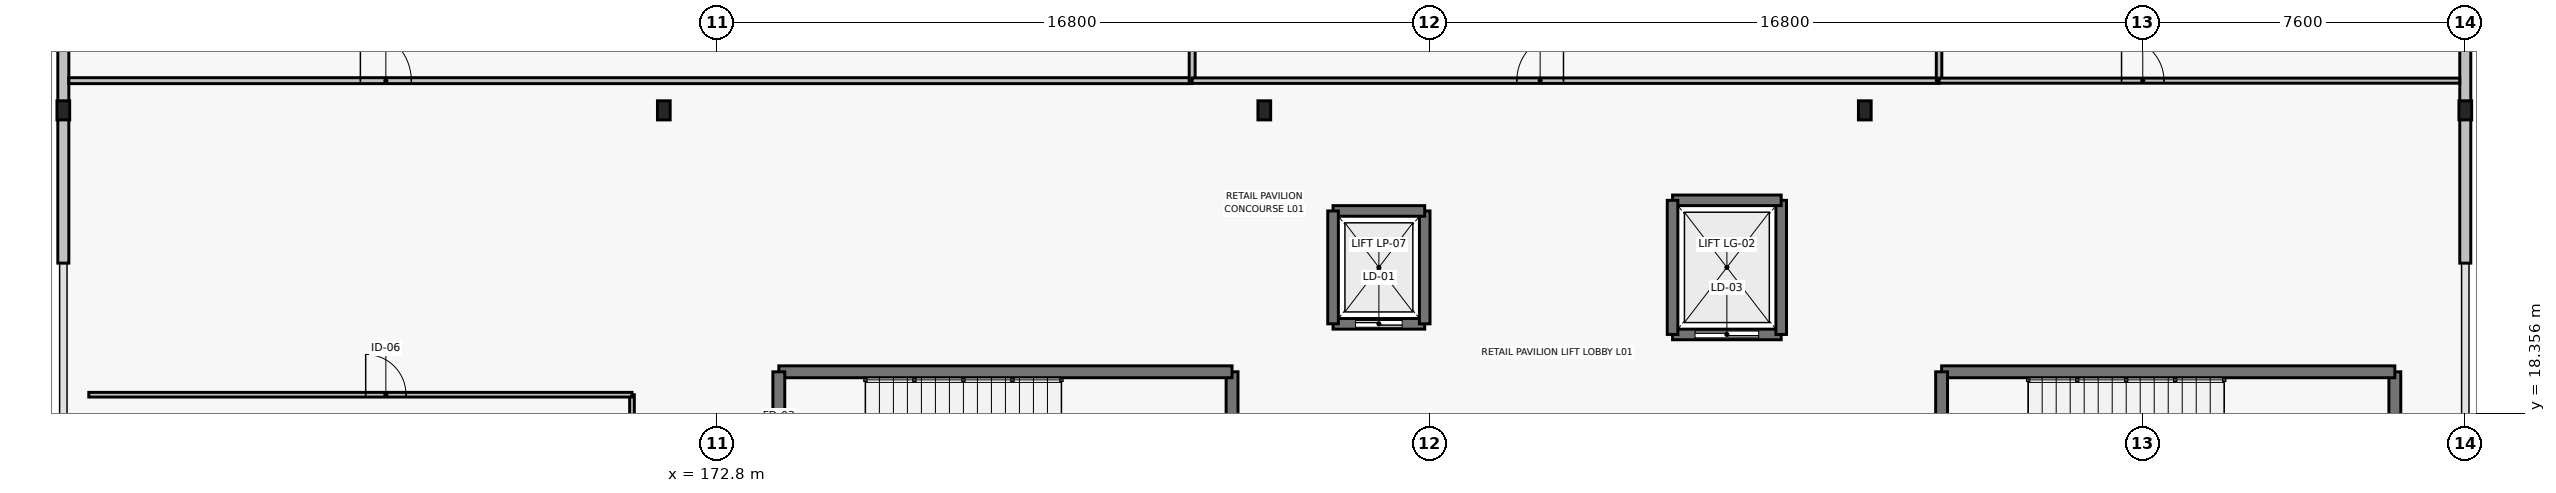
"""IFC4 building model, lengths in metres.
Left out: names, types, materials, properties, quantities, classifications, styles, units other than length and angle.
Written with IfcOpenShell. Run it as: python <this file> out.ifc"""

import sys

from ifc_helpers import new_model, si_unit, direction, frame, frame_2d, origin, origin_2d, place, context, subcontext, project, spatial, rectangle, i_section, extrude, element, fill, save


model = new_model("IFC4")
c1 = context("Model", 3, precision=1e-05, world=origin(), true_north=direction((0.0, 1.0)))
c2 = subcontext(c1, "Body", "Model", "MODEL_VIEW")
j1 = project(units=[si_unit("LENGTHUNIT", "METRE"), si_unit("PLANEANGLEUNIT", "RADIAN")], contexts=[c1])
p1 = place(None, origin())
s1 = spatial("IfcSite", under=j1, at=p1, CompositionType="ELEMENT")
p2 = place(p1, origin())
s2 = spatial("IfcBuilding", under=s1, at=p2, CompositionType="ELEMENT")
p3 = place(p2, frame((0.0, 0.0, 5.4)))
s3 = spatial("IfcBuildingStorey", under=s2, at=p3, CompositionType="ELEMENT", Elevation=5.4)
for number, where, z_axis, x_axis in (
    (1, (157.4, 25.5, 0.0), (0.0, 0.0, 1.0), (1.0, 0.0, 0.0)),
    (2, (171.55, 25.5, 0.0), (0.0, 0.0, 1.0), (1.0, 0.0, 0.0)),
    (3, (185.7, 25.5, 0.0), (0.0, 0.0, 1.0), (1.0, 0.0, 0.0)),
    (4, (199.85, 25.5, 0.0), (0.0, 0.0, 1.0), (1.0, 0.0, 0.0)),
    (5, (214.0, 25.5, 0.0), (0.0, 0.0, 1.0), (1.0, 0.0, 0.0)),
):
    element("IfcColumn", number, at=place(p3, frame(where, z_axis=z_axis, x_axis=x_axis)), inside=s3, PredefinedType="COLUMN", context=c2, shape_type="SweptSolid", body=[
        extrude(i_section(OverallWidth=0.3, OverallDepth=0.45, WebThickness=0.014, FlangeThickness=0.026, FilletRadius=0.027, at=origin_2d()), origin(), (0.0, 0.0, 1.0), 5.4),
    ])
for number, where, z_axis, x_axis in (
    (6, (157.4, 21.9, 0.0), (0.0, 0.0, 1.0), (0.0, 1.0, 0.0)),
    (7, (157.4, 25.5, 0.0), (0.0, 0.0, 1.0), (0.0, 1.0, 0.0)),
    (8, (214.0, 21.9, 0.0), (0.0, 0.0, 1.0), (0.0, 1.0, 0.0)),
    (9, (214.0, 25.5, 0.0), (0.0, 0.0, 1.0), (0.0, 1.0, 0.0)),
):
    element("IfcWall", number, at=place(p3, frame(where, z_axis=z_axis, x_axis=x_axis)), inside=s3, PredefinedType="STANDARD", context=c2, shape_type="SweptSolid", body=[
        extrude(rectangle(XDim=3.6, YDim=0.26, at=frame_2d((1.8, 0.0))), origin(), (0.0, 0.0, 1.0), 4.675),
    ])
p4 = place(p3, frame((184.94, 15.06, 0.0), z_axis=(0.0, 0.0, 1.0), x_axis=(0.0, 1.0, 0.0)))
e10 = element("IfcWall", 10, at=p4, inside=s3, PredefinedType="SHEAR", context=c2, shape_type="SweptSolid", body=[
    extrude(rectangle(XDim=4.28, YDim=0.28, at=frame_2d((2.14, 0.0))), origin(), (0.0, 0.0, 1.0), 5.18),
])
p5 = place(p3, frame((184.94, 19.34, 0.0), z_axis=(0.0, 0.0, 1.0), x_axis=(-1.0, 0.0, 0.0)))
e11 = element("IfcWall", 11, at=p5, inside=s3, PredefinedType="SHEAR", context=c2, shape_type="SweptSolid", body=[
    extrude(rectangle(XDim=10.68, YDim=0.28, at=frame_2d((5.34, 0.0))), origin(), (0.0, 0.0, 1.0), 5.18),
])
p6 = place(p3, frame((174.26, 19.34, 0.0), z_axis=(0.0, 0.0, 1.0), x_axis=(0.0, -1.0, 0.0)))
e12 = element("IfcWall", 12, at=p6, inside=s3, PredefinedType="SHEAR", context=c2, shape_type="SweptSolid", body=[
    extrude(rectangle(XDim=4.28, YDim=0.28, at=frame_2d((2.14, 0.0))), origin(), (0.0, 0.0, 1.0), 5.18),
])
p7 = place(p6, frame((1.565, 0.0, 0.0)))
e13 = element("IfcOpeningElement", 13, at=p7, cuts=e12, PredefinedType="OPENING", context=c2, shape_type="SweptSolid", body=[
    extrude(rectangle(XDim=1.15, YDim=2.2, at=frame_2d((0.575, 1.1))), frame((0.0, 0.15, 0.0), z_axis=(0.0, -1.0, 0.0), x_axis=(1.0, 0.0, 0.0)), (0.0, 0.0, 1.0), 0.3),
])
p8 = place(p3, frame((212.34, 15.06, 0.0), z_axis=(0.0, 0.0, 1.0), x_axis=(0.0, 1.0, 0.0)))
e14 = element("IfcWall", 14, at=p8, inside=s3, PredefinedType="SHEAR", context=c2, shape_type="SweptSolid", body=[
    extrude(rectangle(XDim=4.28, YDim=0.28, at=frame_2d((2.14, 0.0))), origin(), (0.0, 0.0, 1.0), 5.18),
])
p9 = place(p3, frame((212.34, 19.34, 0.0), z_axis=(0.0, 0.0, 1.0), x_axis=(-1.0, 0.0, 0.0)))
e15 = element("IfcWall", 15, at=p9, inside=s3, PredefinedType="SHEAR", context=c2, shape_type="SweptSolid", body=[
    extrude(rectangle(XDim=10.68, YDim=0.28, at=frame_2d((5.34, 0.0))), origin(), (0.0, 0.0, 1.0), 5.18),
])
p10 = place(p3, frame((201.66, 19.34, 0.0), z_axis=(0.0, 0.0, 1.0), x_axis=(0.0, -1.0, 0.0)))
e16 = element("IfcWall", 16, at=p10, inside=s3, PredefinedType="SHEAR", context=c2, shape_type="SweptSolid", body=[
    extrude(rectangle(XDim=4.28, YDim=0.28, at=frame_2d((2.14, 0.0))), origin(), (0.0, 0.0, 1.0), 5.18),
])
p11 = place(p10, frame((1.565, 0.0, 0.0)))
e17 = element("IfcOpeningElement", 17, at=p11, cuts=e16, PredefinedType="OPENING", context=c2, shape_type="SweptSolid", body=[
    extrude(rectangle(XDim=1.15, YDim=2.2, at=frame_2d((0.575, 1.1))), frame((0.0, 0.15, 0.0), z_axis=(0.0, -1.0, 0.0), x_axis=(1.0, 0.0, 0.0)), (0.0, 0.0, 1.0), 0.3),
])
p12 = place(p3, frame((187.32, 20.47, 0.0), z_axis=(0.0, 0.0, 1.0), x_axis=(1.0, 0.0, 0.0)))
e18 = element("IfcWall", 18, at=p12, inside=s3, PredefinedType="SHEAR", context=c2, shape_type="SweptSolid", body=[
    extrude(rectangle(XDim=2.16, YDim=0.25, at=frame_2d((1.08, 0.0))), origin(), (0.0, 0.0, 1.0), 5.18),
])
p13 = place(p12, frame((0.53, 0.0, 0.0)))
e19 = element("IfcOpeningElement", 19, at=p13, cuts=e18, PredefinedType="OPENING", context=c2, shape_type="SweptSolid", body=[
    extrude(rectangle(XDim=1.1, YDim=2.2, at=frame_2d((0.55, 1.1))), frame((0.0, 0.135, 0.0), z_axis=(0.0, -1.0, 0.0), x_axis=(1.0, 0.0, 0.0)), (0.0, 0.0, 1.0), 0.27),
])
p14 = place(p3, frame((189.48, 20.47, 0.0), z_axis=(0.0, 0.0, 1.0), x_axis=(0.0, 1.0, 0.0)))
e20 = element("IfcWall", 20, at=p14, inside=s3, PredefinedType="SHEAR", context=c2, shape_type="SweptSolid", body=[
    extrude(rectangle(XDim=2.66, YDim=0.25, at=frame_2d((1.33, 0.0))), origin(), (0.0, 0.0, 1.0), 5.18),
])
p15 = place(p3, frame((189.48, 23.13, 0.0), z_axis=(0.0, 0.0, 1.0), x_axis=(-1.0, 0.0, 0.0)))
e21 = element("IfcWall", 21, at=p15, inside=s3, PredefinedType="SHEAR", context=c2, shape_type="SweptSolid", body=[
    extrude(rectangle(XDim=2.16, YDim=0.25, at=frame_2d((1.08, 0.0))), origin(), (0.0, 0.0, 1.0), 5.18),
])
p16 = place(p3, frame((187.32, 23.13, 0.0), z_axis=(0.0, 0.0, 1.0), x_axis=(0.0, -1.0, 0.0)))
e22 = element("IfcWall", 22, at=p16, inside=s3, PredefinedType="SHEAR", context=c2, shape_type="SweptSolid", body=[
    extrude(rectangle(XDim=2.66, YDim=0.25, at=frame_2d((1.33, 0.0))), origin(), (0.0, 0.0, 1.0), 5.18),
])
p17 = place(p3, frame((195.32, 20.22, 0.0), z_axis=(0.0, 0.0, 1.0), x_axis=(1.0, 0.0, 0.0)))
e23 = element("IfcWall", 23, at=p17, inside=s3, PredefinedType="SHEAR", context=c2, shape_type="SweptSolid", body=[
    extrude(rectangle(XDim=2.56, YDim=0.25, at=frame_2d((1.28, 0.0))), origin(), (0.0, 0.0, 1.0), 5.18),
])
p18 = place(p17, frame((0.53, 0.0, 0.0)))
e24 = element("IfcOpeningElement", 24, at=p18, cuts=e23, PredefinedType="OPENING", context=c2, shape_type="SweptSolid", body=[
    extrude(rectangle(XDim=1.5, YDim=2.3, at=frame_2d((0.75, 1.15))), frame((0.0, 0.135, 0.0), z_axis=(0.0, -1.0, 0.0), x_axis=(1.0, 0.0, 0.0)), (0.0, 0.0, 1.0), 0.27),
])
p19 = place(p3, frame((197.88, 20.22, 0.0), z_axis=(0.0, 0.0, 1.0), x_axis=(0.0, 1.0, 0.0)))
e25 = element("IfcWall", 25, at=p19, inside=s3, PredefinedType="SHEAR", context=c2, shape_type="SweptSolid", body=[
    extrude(rectangle(XDim=3.16, YDim=0.25, at=frame_2d((1.58, 0.0))), origin(), (0.0, 0.0, 1.0), 5.18),
])
p20 = place(p3, frame((197.88, 23.38, 0.0), z_axis=(0.0, 0.0, 1.0), x_axis=(-1.0, 0.0, 0.0)))
e26 = element("IfcWall", 26, at=p20, inside=s3, PredefinedType="SHEAR", context=c2, shape_type="SweptSolid", body=[
    extrude(rectangle(XDim=2.56, YDim=0.25, at=frame_2d((1.28, 0.0))), origin(), (0.0, 0.0, 1.0), 5.18),
])
p21 = place(p3, frame((195.32, 23.38, 0.0), z_axis=(0.0, 0.0, 1.0), x_axis=(0.0, -1.0, 0.0)))
e27 = element("IfcWall", 27, at=p21, inside=s3, PredefinedType="SHEAR", context=c2, shape_type="SweptSolid", body=[
    extrude(rectangle(XDim=3.16, YDim=0.25, at=frame_2d((1.58, 0.0))), origin(), (0.0, 0.0, 1.0), 5.18),
])
p22 = place(p3, frame((157.53, 26.2, 0.0), z_axis=(0.0, 0.0, 1.0), x_axis=(1.0, 0.0, 0.0)))
e28 = element("IfcWall", 28, at=p22, inside=s3, PredefinedType="PARTITIONING", context=c2, shape_type="SweptSolid", body=[
    extrude(rectangle(XDim=26.47, YDim=0.14, at=frame_2d((13.235, 0.0))), origin(), (0.0, 0.0, 1.0), 4.625),
])
p23 = place(p22, frame((6.87, 0.0, 0.0)))
e29 = element("IfcOpeningElement", 29, at=p23, cuts=e28, PredefinedType="OPENING", context=c2, shape_type="SweptSolid", body=[
    extrude(rectangle(XDim=1.2, YDim=2.2, at=frame_2d((0.6, 1.1))), frame((0.0, 0.08, 0.0), z_axis=(0.0, -1.0, 0.0), x_axis=(1.0, 0.0, 0.0)), (0.0, 0.0, 1.0), 0.16),
])
p24 = place(p3, frame((184.0, 26.2, 0.0), z_axis=(0.0, 0.0, 1.0), x_axis=(0.0, 1.0, 0.0)))
e30 = element("IfcWall", 30, at=p24, inside=s3, PredefinedType="PARTITIONING", context=c2, shape_type="SweptSolid", body=[
    extrude(rectangle(XDim=11.67, YDim=0.14, at=frame_2d((5.835, 0.0))), origin(), (0.0, 0.0, 1.0), 5.16),
])
p25 = place(p3, frame((184.0, 26.2, 0.0), z_axis=(0.0, 0.0, 1.0), x_axis=(1.0, 0.0, 0.0)))
e31 = element("IfcWall", 31, at=p25, inside=s3, PredefinedType="PARTITIONING", context=c2, shape_type="SweptSolid", body=[
    extrude(rectangle(XDim=17.6, YDim=0.13, at=frame_2d((8.8, 0.0))), origin(), (0.0, 0.0, 1.0), 4.625),
])
p26 = place(p25, frame((8.75, 0.0, 0.0), z_axis=(0.0, 0.0, 1.0), x_axis=(-1.0, 0.0, 0.0)))
e32 = element("IfcOpeningElement", 32, at=p26, cuts=e31, PredefinedType="OPENING", context=c2, shape_type="SweptSolid", body=[
    extrude(rectangle(XDim=1.1, YDim=2.15, at=frame_2d((0.55, 1.075))), frame((0.0, 0.075, 0.0), z_axis=(0.0, -1.0, 0.0), x_axis=(1.0, 0.0, 0.0)), (0.0, 0.0, 1.0), 0.15),
])
p27 = place(p3, frame((201.6, 26.2, 0.0), z_axis=(0.0, 0.0, 1.0), x_axis=(0.0, 1.0, 0.0)))
e33 = element("IfcWall", 33, at=p27, inside=s3, PredefinedType="PARTITIONING", context=c2, shape_type="SweptSolid", body=[
    extrude(rectangle(XDim=11.67, YDim=0.13, at=frame_2d((5.835, 0.0))), origin(), (0.0, 0.0, 1.0), 5.16),
])
p28 = place(p3, frame((201.6, 26.2, 0.0), z_axis=(0.0, 0.0, 1.0), x_axis=(1.0, 0.0, 0.0)))
e34 = element("IfcWall", 34, at=p28, inside=s3, PredefinedType="PARTITIONING", context=c2, shape_type="SweptSolid", body=[
    extrude(rectangle(XDim=12.27, YDim=0.12, at=frame_2d((6.135, 0.0))), origin(), (0.0, 0.0, 1.0), 4.625),
])
p29 = place(p28, frame((4.3, 0.0, 0.0)))
e35 = element("IfcOpeningElement", 35, at=p29, cuts=e34, PredefinedType="OPENING", context=c2, shape_type="SweptSolid", body=[
    extrude(rectangle(XDim=1.0, YDim=2.15, at=frame_2d((0.5, 1.075))), frame((0.0, 0.07, 0.0), z_axis=(0.0, -1.0, 0.0), x_axis=(1.0, 0.0, 0.0)), (0.0, 0.0, 1.0), 0.14),
])
p30 = place(p3, frame((170.8, 13.6, 0.0), z_axis=(0.0, 0.0, 1.0), x_axis=(0.0, 1.0, 0.0)))
e36 = element("IfcWall", 36, at=p30, inside=s3, PredefinedType="MOVABLE", context=c2, shape_type="SweptSolid", body=[
    extrude(rectangle(XDim=5.2, YDim=0.11, at=frame_2d((2.6, 0.0))), origin(), (0.0, 0.0, 1.0), 4.675),
])
p31 = place(p3, frame((170.8, 18.8, 0.0), z_axis=(0.0, 0.0, 1.0), x_axis=(-1.0, 0.0, 0.0)))
e37 = element("IfcWall", 37, at=p31, inside=s3, PredefinedType="MOVABLE", context=c2, shape_type="SweptSolid", body=[
    extrude(rectangle(XDim=12.8, YDim=0.11, at=frame_2d((6.4, 0.0))), origin(), (0.0, 0.0, 1.0), 5.16),
])
p32 = place(p31, frame((5.325, 0.0, 0.0)))
e38 = element("IfcOpeningElement", 38, at=p32, cuts=e37, PredefinedType="OPENING", context=c2, shape_type="SweptSolid", body=[
    extrude(rectangle(XDim=0.95, YDim=2.15, at=frame_2d((0.475, 1.075))), frame((0.0, 0.065, 0.0), z_axis=(0.0, -1.0, 0.0), x_axis=(1.0, 0.0, 0.0)), (0.0, 0.0, 1.0), 0.13),
])
p33 = place(p13, origin())
e39 = element("IfcDoor", 39, at=p33, inside=s3, OperationType="SLIDING_TO_RIGHT", PredefinedType="DOOR", context=c2, shape_type="SweptSolid", body=[
    extrude(rectangle(XDim=1.1, YDim=2.2, at=frame_2d((0.55, 1.1))), frame((0.0, 0.025, 0.0), z_axis=(0.0, -1.0, 0.0), x_axis=(1.0, 0.0, 0.0)), (0.0, 0.0, 1.0), 0.05),
])
fill(e19, e39)
p34 = place(p18, origin())
e40 = element("IfcDoor", 40, at=p34, inside=s3, OperationType="SLIDING_TO_RIGHT", PredefinedType="DOOR", context=c2, shape_type="SweptSolid", body=[
    extrude(rectangle(XDim=1.5, YDim=2.3, at=frame_2d((0.75, 1.15))), frame((0.0, 0.025, 0.0), z_axis=(0.0, -1.0, 0.0), x_axis=(1.0, 0.0, 0.0)), (0.0, 0.0, 1.0), 0.05),
])
fill(e24, e40)
p35 = place(p23, origin())
e41 = element("IfcDoor", 41, at=p35, inside=s3, OperationType="SINGLE_SWING_LEFT", PredefinedType="DOOR", context=c2, shape_type="SweptSolid", body=[
    extrude(rectangle(XDim=1.2, YDim=2.2, at=frame_2d((0.6, 1.1))), frame((0.0, 0.025, 0.0), z_axis=(0.0, -1.0, 0.0), x_axis=(1.0, 0.0, 0.0)), (0.0, 0.0, 1.0), 0.05),
])
fill(e29, e41)
p36 = place(p26, origin())
e42 = element("IfcDoor", 42, at=p36, inside=s3, OperationType="SINGLE_SWING_RIGHT", PredefinedType="DOOR", context=c2, shape_type="SweptSolid", body=[
    extrude(rectangle(XDim=1.1, YDim=2.15, at=frame_2d((0.55, 1.075))), frame((0.0, 0.025, 0.0), z_axis=(0.0, -1.0, 0.0), x_axis=(1.0, 0.0, 0.0)), (0.0, 0.0, 1.0), 0.05),
])
fill(e32, e42)
p37 = place(p29, origin())
e43 = element("IfcDoor", 43, at=p37, inside=s3, OperationType="SINGLE_SWING_LEFT", PredefinedType="DOOR", context=c2, shape_type="SweptSolid", body=[
    extrude(rectangle(XDim=1.0, YDim=2.15, at=frame_2d((0.5, 1.075))), frame((0.0, 0.025, 0.0), z_axis=(0.0, -1.0, 0.0), x_axis=(1.0, 0.0, 0.0)), (0.0, 0.0, 1.0), 0.05),
])
fill(e35, e43)
p38 = place(p32, origin())
e44 = element("IfcDoor", 44, at=p38, inside=s3, OperationType="SINGLE_SWING_RIGHT", PredefinedType="DOOR", context=c2, shape_type="SweptSolid", body=[
    extrude(rectangle(XDim=0.95, YDim=2.15, at=frame_2d((0.475, 1.075))), frame((0.0, 0.025, 0.0), z_axis=(0.0, -1.0, 0.0), x_axis=(1.0, 0.0, 0.0)), (0.0, 0.0, 1.0), 0.05),
])
fill(e38, e44)
save(model, sys.argv[1])
